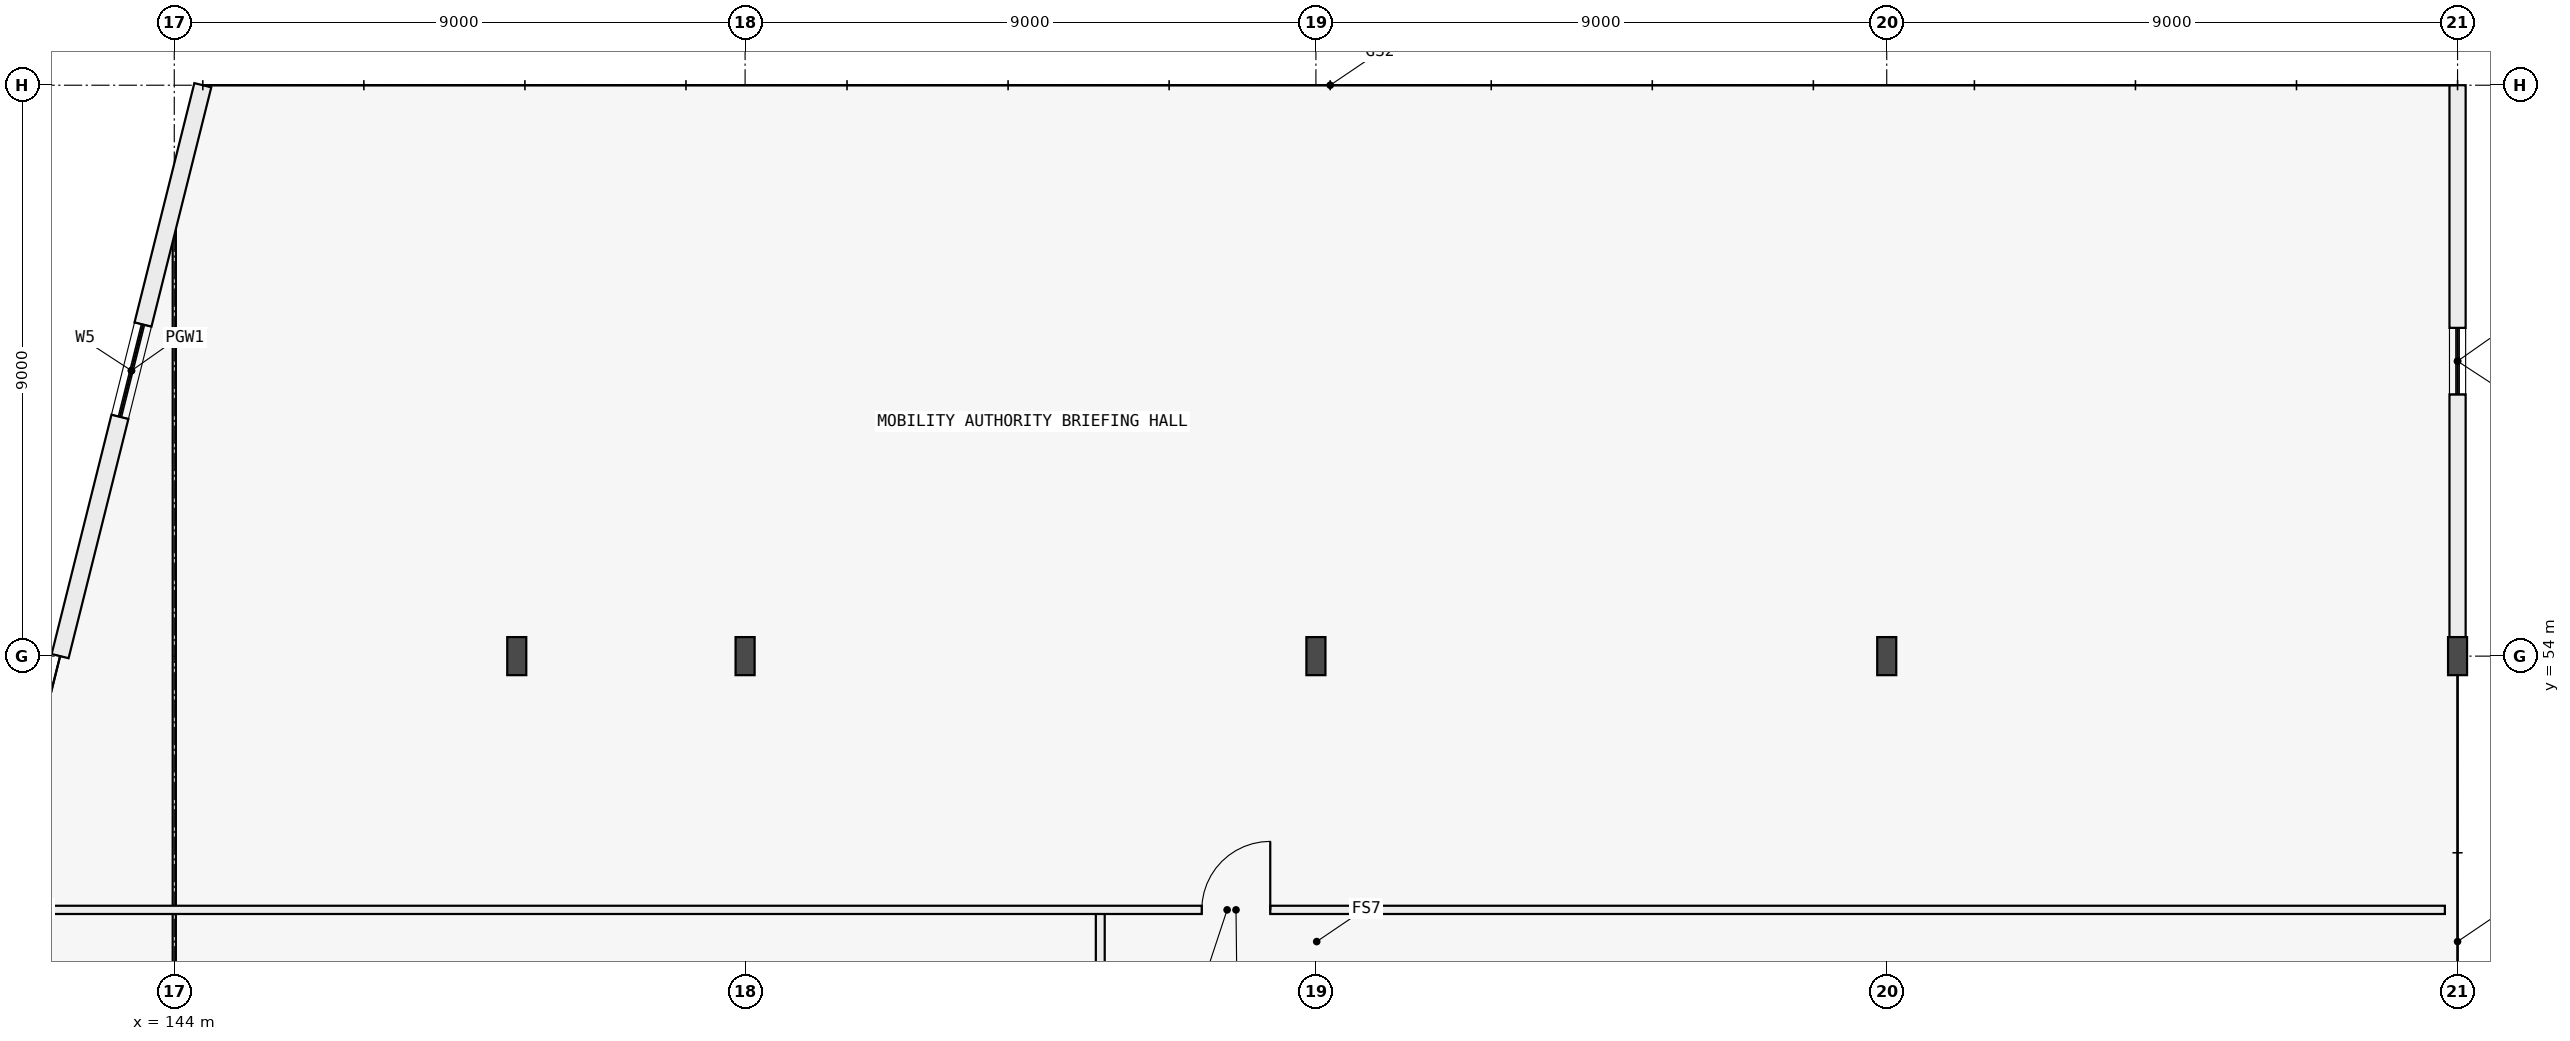
"""IFC4 building model, lengths in metres.
Left out: names, types, materials, properties, quantities, classifications, styles, units other than length and angle.
Written with IfcOpenShell. Run it as: python <this file> out.ifc"""

import sys

from ifc_helpers import new_model, si_unit, direction, frame, frame_2d, origin, origin_2d, place, context, subcontext, project, spatial, rectangle, i_section, extrude, element, fill, save


model = new_model("IFC4")
c1 = context("Model", 3, precision=1e-05, world=origin(), true_north=direction((0.0, 1.0)))
c2 = subcontext(c1, "Body", "Model", "MODEL_VIEW")
j1 = project(units=[si_unit("LENGTHUNIT", "METRE"), si_unit("PLANEANGLEUNIT", "RADIAN")], contexts=[c1])
p1 = place(None, origin())
s1 = spatial("IfcSite", under=j1, at=p1, CompositionType="ELEMENT")
p2 = place(p1, origin())
s2 = spatial("IfcBuilding", under=s1, at=p2, CompositionType="ELEMENT")
p3 = place(p2, frame((0.0, 0.0, 21.0)))
s3 = spatial("IfcBuildingStorey", under=s2, at=p3, CompositionType="ELEMENT", Elevation=21.0)
for number, where, z_axis, x_axis in (
    (1, (149.4, 54.0, 0.0), (0.0, 0.0, 1.0), (1.0, 0.0, 0.0)),
    (2, (153.0, 54.0, 0.0), (0.0, 0.0, 1.0), (1.0, 0.0, 0.0)),
    (3, (162.0, 54.0, 0.0), (0.0, 0.0, 1.0), (1.0, 0.0, 0.0)),
    (4, (171.0, 54.0, 0.0), (0.0, 0.0, 1.0), (1.0, 0.0, 0.0)),
    (5, (180.0, 54.0, 0.0), (0.0, 0.0, 1.0), (1.0, 0.0, 0.0)),
):
    element("IfcColumn", number, at=place(p3, frame(where, z_axis=z_axis, x_axis=x_axis)), inside=s3, PredefinedType="COLUMN", context=c2, shape_type="SweptSolid", body=[
        extrude(i_section(OverallWidth=0.3, OverallDepth=0.6, WebThickness=0.015, FlangeThickness=0.03, FilletRadius=0.027, at=origin_2d()), origin(), (0.0, 0.0, 1.0), 4.2),
    ])
p4 = place(p3, frame((180.0, 54.3, 0.0), z_axis=(0.0, 0.0, 1.0), x_axis=(0.0, 1.0, 0.0)))
e6 = element("IfcWall", 6, at=p4, inside=s3, PredefinedType="POLYGONAL", context=c2, shape_type="SweptSolid", body=[
    extrude(rectangle(XDim=8.7, YDim=0.255, at=frame_2d((4.35, 0.0))), origin(), (0.0, 0.0, 1.0), 3.96),
])
p5 = place(p4, frame((3.825, 0.0, 0.95)))
e7 = element("IfcOpeningElement", 7, at=p5, cuts=e6, PredefinedType="OPENING", context=c2, shape_type="SweptSolid", body=[
    extrude(rectangle(XDim=1.05, YDim=1.25, at=frame_2d((0.525, 0.625))), frame((0.0, 0.137, 0.0), z_axis=(0.0, -1.0, 0.0), x_axis=(1.0, 0.0, 0.0)), (0.0, 0.0, 1.0), 0.275),
])
p6 = place(p3, frame((142.2, 54.0, 0.0), z_axis=(0.0, 0.0, 1.0), x_axis=(0.242535625036, 0.970142500145, 0.0)))
e8 = element("IfcWall", 8, at=p6, inside=s3, PredefinedType="POLYGONAL", context=c2, shape_type="SweptSolid", body=[
    extrude(rectangle(XDim=9.277, YDim=0.275, at=frame_2d((4.639, 0.0))), origin(), (0.0, 0.0, 1.0), 3.96),
])
p7 = place(p6, frame((3.888, 0.0, 0.95)))
e9 = element("IfcOpeningElement", 9, at=p7, cuts=e8, PredefinedType="OPENING", context=c2, shape_type="SweptSolid", body=[
    extrude(rectangle(XDim=1.5, YDim=1.5, at=frame_2d((0.75, 0.75))), frame((0.0, 0.147, 0.0), z_axis=(0.0, -1.0, 0.0), x_axis=(1.0, 0.0, 0.0)), (0.0, 0.0, 1.0), 0.295),
])
p8 = place(p3, frame((158.6, 36.2, 0.0), z_axis=(0.0, 0.0, 1.0), x_axis=(0.0, 1.0, 0.0)))
e10 = element("IfcWall", 10, at=p8, inside=s3, PredefinedType="PARTITIONING", context=c2, shape_type="SweptSolid", body=[
    extrude(rectangle(XDim=13.8, YDim=0.14, at=frame_2d((6.9, 0.0))), origin(), (0.0, 0.0, 1.0), 3.665),
])
p9 = place(p8, frame((6.3, 0.0, 0.0)))
e11 = element("IfcOpeningElement", 11, at=p9, cuts=e10, PredefinedType="OPENING", context=c2, shape_type="SweptSolid", body=[
    extrude(rectangle(XDim=1.0, YDim=2.1, at=frame_2d((0.5, 1.05))), frame((0.0, 0.08, 0.0), z_axis=(0.0, -1.0, 0.0), x_axis=(1.0, 0.0, 0.0)), (0.0, 0.0, 1.0), 0.16),
])
p10 = place(p3, frame((141.4, 50.0, 0.0), z_axis=(0.0, 0.0, 1.0), x_axis=(1.0, 0.0, 0.0)))
e12 = element("IfcWall", 12, at=p10, inside=s3, PredefinedType="PARTITIONING", context=c2, shape_type="SweptSolid", body=[
    extrude(rectangle(XDim=38.4, YDim=0.13, at=frame_2d((19.2, 0.0))), origin(), (0.0, 0.0, 1.0), 3.96),
])
p11 = place(p10, frame((18.8, 0.0, 0.0)))
e13 = element("IfcOpeningElement", 13, at=p11, cuts=e12, PredefinedType="OPENING", context=c2, shape_type="SweptSolid", body=[
    extrude(rectangle(XDim=1.08, YDim=2.12, at=frame_2d((0.54, 1.06))), frame((0.0, 0.075, 0.0), z_axis=(0.0, -1.0, 0.0), x_axis=(1.0, 0.0, 0.0)), (0.0, 0.0, 1.0), 0.15),
])
p12 = place(p5, origin())
e14 = element("IfcWindow", 14, at=p12, inside=s3, PartitioningType="SINGLE_PANEL", PredefinedType="WINDOW", context=c2, shape_type="SweptSolid", body=[
    extrude(rectangle(XDim=1.05, YDim=1.25, at=frame_2d((0.525, 0.625))), frame((0.0, 0.03, 0.0), z_axis=(0.0, -1.0, 0.0), x_axis=(1.0, 0.0, 0.0)), (0.0, 0.0, 1.0), 0.06),
])
fill(e7, e14)
p13 = place(p7, origin())
e15 = element("IfcWindow", 15, at=p13, inside=s3, PartitioningType="SINGLE_PANEL", PredefinedType="WINDOW", context=c2, shape_type="SweptSolid", body=[
    extrude(rectangle(XDim=1.5, YDim=1.5, at=frame_2d((0.75, 0.75))), frame((0.0, 0.03, 0.0), z_axis=(0.0, -1.0, 0.0), x_axis=(1.0, 0.0, 0.0)), (0.0, 0.0, 1.0), 0.06),
])
fill(e9, e15)
p14 = place(p11, origin())
e16 = element("IfcDoor", 16, at=p14, inside=s3, OperationType="SINGLE_SWING_RIGHT", PredefinedType="DOOR", context=c2, shape_type="SweptSolid", body=[
    extrude(rectangle(XDim=1.08, YDim=2.12, at=frame_2d((0.54, 1.06))), frame((0.0, 0.025, 0.0), z_axis=(0.0, -1.0, 0.0), x_axis=(1.0, 0.0, 0.0)), (0.0, 0.0, 1.0), 0.05),
])
fill(e13, e16)
save(model, sys.argv[1])
